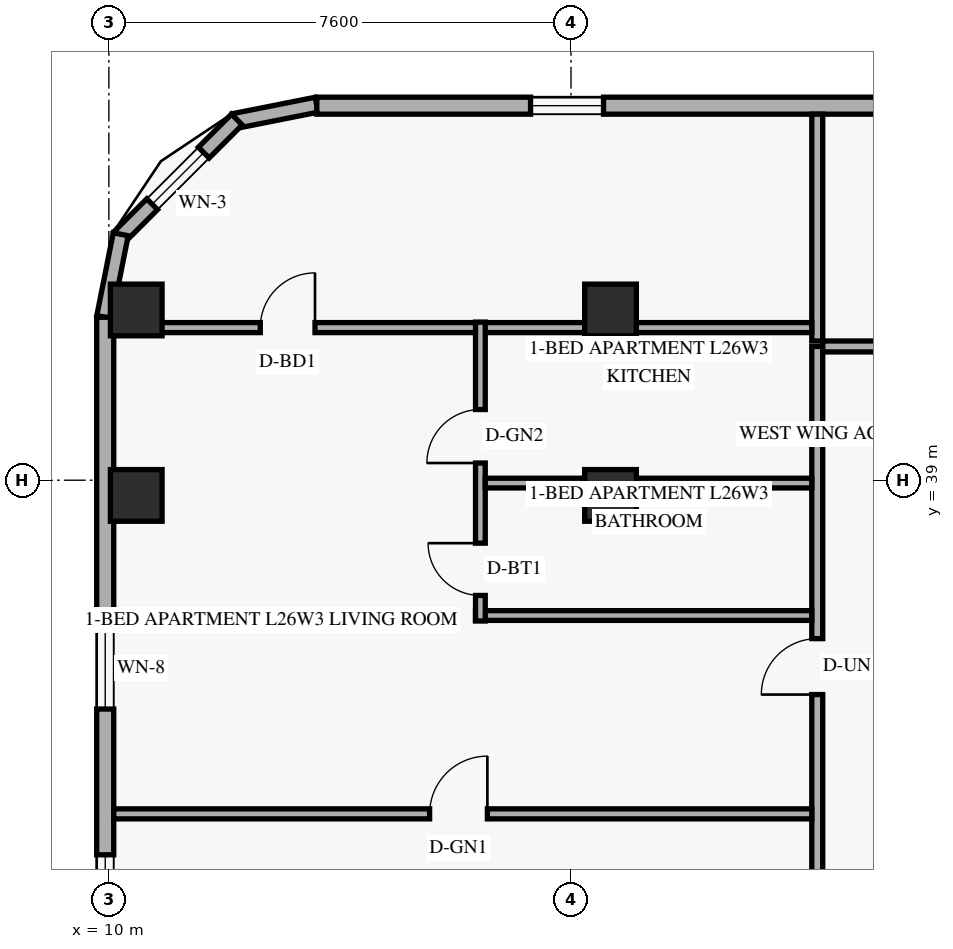
"""IFC4 building model, lengths in metres.
Left out: names, types, materials, properties, quantities, classifications, styles, units other than length and angle.
Written with IfcOpenShell. Run it as: python <this file> out.ifc"""

import sys

from ifc_helpers import new_model, si_unit, direction, frame, frame_2d, origin, origin_2d, place, context, subcontext, project, spatial, rectangle, extrude, element, fill, save


model = new_model("IFC4")
c1 = context("Model", 3, precision=1e-05, world=origin(), true_north=direction((0.0, 1.0)))
c2 = subcontext(c1, "Body", "Model", "MODEL_VIEW")
j1 = project(units=[si_unit("LENGTHUNIT", "METRE"), si_unit("PLANEANGLEUNIT", "RADIAN")], contexts=[c1])
p1 = place(None, origin())
s1 = spatial("IfcSite", under=j1, at=p1, CompositionType="ELEMENT")
p2 = place(p1, origin())
s2 = spatial("IfcBuilding", under=s1, at=p2, CompositionType="ELEMENT")
p3 = place(p2, frame((0.0, 0.0, 102.6)))
s3 = spatial("IfcBuildingStorey", under=s2, at=p3, CompositionType="ELEMENT", Elevation=102.6)
for number, where, z_axis, x_axis in (
    (1, (10.45, 38.75, 0.0), (0.0, 0.0, 1.0), (1.0, 0.0, 0.0)),
    (2, (10.45, 41.8, 0.0), (0.0, 0.0, 1.0), (1.0, 0.0, 0.0)),
    (3, (18.25, 38.75, 0.0), (0.0, 0.0, 1.0), (1.0, 0.0, 0.0)),
    (4, (18.25, 41.8, 0.0), (0.0, 0.0, 1.0), (1.0, 0.0, 0.0)),
):
    element("IfcColumn", number, at=place(p3, frame(where, z_axis=z_axis, x_axis=x_axis)), inside=s3, PredefinedType="COLUMN", context=c2, shape_type="SweptSolid", body=[
        extrude(rectangle(XDim=0.85, YDim=0.85, at=origin_2d()), origin(), (0.0, 0.0, 1.0), 3.6),
    ])
p4 = place(p3, frame((13.417, 45.176, 0.0), z_axis=(0.0, 0.0, 1.0), x_axis=(-0.980809899341, -0.19496651342, 0.0)))
e5 = element("IfcWall", 5, at=p4, inside=s3, PredefinedType="SOLIDWALL", context=c2, shape_type="SweptSolid", body=[
    extrude(rectangle(XDim=1.389, YDim=0.25, at=frame_2d((0.694, 0.0))), origin(), (0.0, 0.0, 1.0), 3.36),
])
p5 = place(p3, frame((12.105, 44.932, 0.0), z_axis=(0.0, 0.0, 1.0), x_axis=(-0.707151344399, -0.707062215165, 0.0)))
e6 = element("IfcWall", 6, at=p5, inside=s3, PredefinedType="SOLIDWALL", context=c2, shape_type="SweptSolid", body=[
    extrude(rectangle(XDim=2.739, YDim=0.25, at=frame_2d((1.37, 0.0))), origin(), (0.0, 0.0, 1.0), 3.36),
])
p6 = place(p5, frame((0.77, 0.0, 0.85)))
e7 = element("IfcOpeningElement", 7, at=p6, cuts=e6, PredefinedType="OPENING", context=c2, shape_type="SweptSolid", body=[
    extrude(rectangle(XDim=1.2, YDim=1.5, at=frame_2d((0.6, 0.75))), frame((0.0, 0.135, 0.0), z_axis=(0.0, -1.0, 0.0), x_axis=(1.0, 0.0, 0.0)), (0.0, 0.0, 1.0), 0.27),
])
p7 = place(p3, frame((10.195, 43.045, 0.0), z_axis=(0.0, 0.0, 1.0), x_axis=(-0.195000137217, -0.980803214965, 0.0)))
e8 = element("IfcWall", 8, at=p7, inside=s3, PredefinedType="SOLIDWALL", context=c2, shape_type="SweptSolid", body=[
    extrude(rectangle(XDim=1.388, YDim=0.25, at=frame_2d((0.694, 0.0))), origin(), (0.0, 0.0, 1.0), 3.36),
])
p8 = place(p3, frame((49.98, 45.16, 0.0), z_axis=(0.0, 0.0, 1.0), x_axis=(-1.0, 0.0, 0.0)))
e9 = element("IfcWall", 9, at=p8, inside=s3, PredefinedType="SOLIDWALL", context=c2, shape_type="SweptSolid", body=[
    extrude(rectangle(XDim=36.56, YDim=0.28, at=frame_2d((18.28, 0.0))), origin(), (0.0, 0.0, 1.0), 3.36),
])
p9 = place(p8, frame((31.845, 0.0, 0.85)))
e10 = element("IfcOpeningElement", 10, at=p9, cuts=e9, PredefinedType="OPENING", context=c2, shape_type="SweptSolid", body=[
    extrude(rectangle(XDim=1.2, YDim=1.5, at=frame_2d((0.6, 0.75))), frame((0.0, 0.15, 0.0), z_axis=(0.0, -1.0, 0.0), x_axis=(1.0, 0.0, 0.0)), (0.0, 0.0, 1.0), 0.3),
])
p10 = place(p8, frame((23.78, 0.0, 0.85)))
e11 = element("IfcOpeningElement", 11, at=p10, cuts=e9, PredefinedType="OPENING", context=c2, shape_type="SweptSolid", body=[
    extrude(rectangle(XDim=1.2, YDim=1.5, at=frame_2d((0.6, 0.75))), frame((0.0, 0.15, 0.0), z_axis=(0.0, -1.0, 0.0), x_axis=(1.0, 0.0, 0.0)), (0.0, 0.0, 1.0), 0.3),
])
p11 = place(p8, frame((16.895, 0.0, 0.85)))
e12 = element("IfcOpeningElement", 12, at=p11, cuts=e9, PredefinedType="OPENING", context=c2, shape_type="SweptSolid", body=[
    extrude(rectangle(XDim=1.2, YDim=1.5, at=frame_2d((0.6, 0.75))), frame((0.0, 0.15, 0.0), z_axis=(0.0, -1.0, 0.0), x_axis=(1.0, 0.0, 0.0)), (0.0, 0.0, 1.0), 0.3),
])
p12 = place(p8, frame((10.865, 0.0, 0.85)))
e13 = element("IfcOpeningElement", 13, at=p12, cuts=e9, PredefinedType="OPENING", context=c2, shape_type="SweptSolid", body=[
    extrude(rectangle(XDim=1.2, YDim=1.5, at=frame_2d((0.6, 0.75))), frame((0.0, 0.15, 0.0), z_axis=(0.0, -1.0, 0.0), x_axis=(1.0, 0.0, 0.0)), (0.0, 0.0, 1.0), 0.3),
])
p13 = place(p8, frame((5.275, 0.0, 0.85)))
e14 = element("IfcOpeningElement", 14, at=p13, cuts=e9, PredefinedType="OPENING", context=c2, shape_type="SweptSolid", body=[
    extrude(rectangle(XDim=1.2, YDim=1.5, at=frame_2d((0.6, 0.75))), frame((0.0, 0.15, 0.0), z_axis=(0.0, -1.0, 0.0), x_axis=(1.0, 0.0, 0.0)), (0.0, 0.0, 1.0), 0.3),
])
p14 = place(p8, frame((1.09, 0.0, 0.85)))
e15 = element("IfcOpeningElement", 15, at=p14, cuts=e9, PredefinedType="OPENING", context=c2, shape_type="SweptSolid", body=[
    extrude(rectangle(XDim=1.2, YDim=1.5, at=frame_2d((0.6, 0.75))), frame((0.0, 0.15, 0.0), z_axis=(0.0, -1.0, 0.0), x_axis=(1.0, 0.0, 0.0)), (0.0, 0.0, 1.0), 0.3),
])
p15 = place(p3, frame((9.94, 41.68, 0.0), z_axis=(0.0, 0.0, 1.0), x_axis=(0.0, -1.0, 0.0)))
e16 = element("IfcWall", 16, at=p15, inside=s3, PredefinedType="SOLIDWALL", context=c2, shape_type="SweptSolid", body=[
    extrude(rectangle(XDim=35.36, YDim=0.28, at=frame_2d((17.68, 0.0))), origin(), (0.0, 0.0, 1.0), 3.36),
])
p16 = place(p15, frame((27.994, 0.0, 0.85)))
e17 = element("IfcOpeningElement", 17, at=p16, cuts=e16, PredefinedType="OPENING", context=c2, shape_type="SweptSolid", body=[
    extrude(rectangle(XDim=1.35, YDim=1.55, at=frame_2d((0.675, 0.775))), frame((0.0, 0.15, 0.0), z_axis=(0.0, -1.0, 0.0), x_axis=(1.0, 0.0, 0.0)), (0.0, 0.0, 1.0), 0.3),
])
p17 = place(p15, frame((22.018, 0.0, 0.85)))
e18 = element("IfcOpeningElement", 18, at=p17, cuts=e16, PredefinedType="OPENING", context=c2, shape_type="SweptSolid", body=[
    extrude(rectangle(XDim=1.35, YDim=1.55, at=frame_2d((0.675, 0.775))), frame((0.0, 0.15, 0.0), z_axis=(0.0, -1.0, 0.0), x_axis=(1.0, 0.0, 0.0)), (0.0, 0.0, 1.0), 0.3),
])
p18 = place(p15, frame((17.6, 0.0, 0.85)))
e19 = element("IfcOpeningElement", 19, at=p18, cuts=e16, PredefinedType="OPENING", context=c2, shape_type="SweptSolid", body=[
    extrude(rectangle(XDim=1.35, YDim=1.55, at=frame_2d((0.675, 0.775))), frame((0.0, 0.15, 0.0), z_axis=(0.0, -1.0, 0.0), x_axis=(1.0, 0.0, 0.0)), (0.0, 0.0, 1.0), 0.3),
])
p19 = place(p15, frame((12.712, 0.0, 0.85)))
e20 = element("IfcOpeningElement", 20, at=p19, cuts=e16, PredefinedType="OPENING", context=c2, shape_type="SweptSolid", body=[
    extrude(rectangle(XDim=1.35, YDim=1.55, at=frame_2d((0.675, 0.775))), frame((0.0, 0.15, 0.0), z_axis=(0.0, -1.0, 0.0), x_axis=(1.0, 0.0, 0.0)), (0.0, 0.0, 1.0), 0.3),
])
p20 = place(p15, frame((8.841, 0.0, 0.85)))
e21 = element("IfcOpeningElement", 21, at=p20, cuts=e16, PredefinedType="OPENING", context=c2, shape_type="SweptSolid", body=[
    extrude(rectangle(XDim=1.35, YDim=1.55, at=frame_2d((0.675, 0.775))), frame((0.0, 0.15, 0.0), z_axis=(0.0, -1.0, 0.0), x_axis=(1.0, 0.0, 0.0)), (0.0, 0.0, 1.0), 0.3),
])
p21 = place(p15, frame((5.094, 0.0, 0.85)))
e22 = element("IfcOpeningElement", 22, at=p21, cuts=e16, PredefinedType="OPENING", context=c2, shape_type="SweptSolid", body=[
    extrude(rectangle(XDim=1.35, YDim=1.55, at=frame_2d((0.675, 0.775))), frame((0.0, 0.15, 0.0), z_axis=(0.0, -1.0, 0.0), x_axis=(1.0, 0.0, 0.0)), (0.0, 0.0, 1.0), 0.3),
])
p22 = place(p3, frame((21.65, 6.8, 0.0), z_axis=(0.0, 0.0, 1.0), x_axis=(0.0, 1.0, 0.0)))
e23 = element("IfcWall", 23, at=p22, inside=s3, PredefinedType="STANDARD", context=c2, shape_type="SweptSolid", body=[
    extrude(rectangle(XDim=34.4, YDim=0.18, at=frame_2d((17.2, 0.0))), origin(), (0.0, 0.0, 1.0), 2.731),
])
p23 = place(p22, frame((3.592, 0.0, 0.0)))
e24 = element("IfcOpeningElement", 24, at=p23, cuts=e23, PredefinedType="OPENING", context=c2, shape_type="SweptSolid", body=[
    extrude(rectangle(XDim=0.92, YDim=2.15, at=frame_2d((0.46, 1.075))), frame((0.0, 0.1, 0.0), z_axis=(0.0, -1.0, 0.0), x_axis=(1.0, 0.0, 0.0)), (0.0, 0.0, 1.0), 0.2),
])
p24 = place(p22, frame((14.019, 0.0, 0.0)))
e25 = element("IfcOpeningElement", 25, at=p24, cuts=e23, PredefinedType="OPENING", context=c2, shape_type="SweptSolid", body=[
    extrude(rectangle(XDim=0.92, YDim=2.15, at=frame_2d((0.46, 1.075))), frame((0.0, 0.1, 0.0), z_axis=(0.0, -1.0, 0.0), x_axis=(1.0, 0.0, 0.0)), (0.0, 0.0, 1.0), 0.2),
])
p25 = place(p22, frame((28.675, 0.0, 0.0)))
e26 = element("IfcOpeningElement", 26, at=p25, cuts=e23, PredefinedType="OPENING", context=c2, shape_type="SweptSolid", body=[
    extrude(rectangle(XDim=0.92, YDim=2.15, at=frame_2d((0.46, 1.075))), frame((0.0, 0.1, 0.0), z_axis=(0.0, -1.0, 0.0), x_axis=(1.0, 0.0, 0.0)), (0.0, 0.0, 1.0), 0.2),
])
p26 = place(p3, frame((21.74, 41.2, 0.0), z_axis=(0.0, 0.0, 1.0), x_axis=(1.0, 0.0, 0.0)))
e27 = element("IfcWall", 27, at=p26, inside=s3, PredefinedType="STANDARD", context=c2, shape_type="SweptSolid", body=[
    extrude(rectangle(XDim=13.68, YDim=0.18, at=frame_2d((6.84, 0.0))), origin(), (0.0, 0.0, 1.0), 2.731),
])
p27 = place(p26, frame((3.09, 0.0, 0.0)))
e28 = element("IfcOpeningElement", 28, at=p27, cuts=e27, PredefinedType="OPENING", context=c2, shape_type="SweptSolid", body=[
    extrude(rectangle(XDim=0.95, YDim=2.15, at=frame_2d((0.475, 1.075))), frame((0.0, 0.1, 0.0), z_axis=(0.0, -1.0, 0.0), x_axis=(1.0, 0.0, 0.0)), (0.0, 0.0, 1.0), 0.2),
])
p28 = place(p26, frame((10.11, 0.0, 0.0)))
e29 = element("IfcOpeningElement", 29, at=p28, cuts=e27, PredefinedType="OPENING", context=c2, shape_type="SweptSolid", body=[
    extrude(rectangle(XDim=0.95, YDim=2.15, at=frame_2d((0.475, 1.075))), frame((0.0, 0.1, 0.0), z_axis=(0.0, -1.0, 0.0), x_axis=(1.0, 0.0, 0.0)), (0.0, 0.0, 1.0), 0.2),
])
p29 = place(p3, frame((21.65, 41.29, 0.0), z_axis=(0.0, 0.0, 1.0), x_axis=(0.0, 1.0, 0.0)))
e30 = element("IfcWall", 30, at=p29, inside=s3, PredefinedType="PARTITIONING", context=c2, shape_type="SweptSolid", body=[
    extrude(rectangle(XDim=3.73, YDim=0.18, at=frame_2d((1.865, 0.0))), origin(), (0.0, 0.0, 1.0), 2.809),
])
p30 = place(p3, frame((10.08, 41.51, 0.0), z_axis=(0.0, 0.0, 1.0), x_axis=(1.0, 0.0, 0.0)))
e31 = element("IfcWall", 31, at=p30, inside=s3, PredefinedType="PARTITIONING", context=c2, shape_type="SweptSolid", body=[
    extrude(rectangle(XDim=11.48, YDim=0.165, at=frame_2d((5.74, 0.0))), origin(), (0.0, 0.0, 1.0), 3.36),
])
p31 = place(p30, frame((2.41, 0.0, 0.0)))
e32 = element("IfcOpeningElement", 32, at=p31, cuts=e31, PredefinedType="OPENING", context=c2, shape_type="SweptSolid", body=[
    extrude(rectangle(XDim=0.9, YDim=2.14, at=frame_2d((0.45, 1.07))), frame((0.0, 0.093, 0.0), z_axis=(0.0, -1.0, 0.0), x_axis=(1.0, 0.0, 0.0)), (0.0, 0.0, 1.0), 0.185),
])
p32 = place(p3, frame((16.03, 36.774, 0.0), z_axis=(0.0, 0.0, 1.0), x_axis=(1.0, 0.0, 0.0)))
e33 = element("IfcWall", 33, at=p32, inside=s3, PredefinedType="PLUMBINGWALL", context=c2, shape_type="SweptSolid", body=[
    extrude(rectangle(XDim=5.53, YDim=0.16, at=frame_2d((2.765, 0.0))), origin(), (0.0, 0.0, 1.0), 2.731),
])
p33 = place(p3, frame((16.11, 36.685, 0.0), z_axis=(0.0, 0.0, 1.0), x_axis=(0.0, 1.0, 0.0)))
e34 = element("IfcWall", 34, at=p33, inside=s3, PredefinedType="PLUMBINGWALL", context=c2, shape_type="SweptSolid", body=[
    extrude(rectangle(XDim=4.916, YDim=0.16, at=frame_2d((2.458, 0.0))), origin(), (0.0, 0.0, 1.0), 2.731),
])
p34 = place(p33, frame((0.42, 0.0, 0.0)))
e35 = element("IfcOpeningElement", 35, at=p34, cuts=e34, PredefinedType="OPENING", context=c2, shape_type="SweptSolid", body=[
    extrude(rectangle(XDim=0.86, YDim=2.12, at=frame_2d((0.43, 1.06))), frame((0.0, 0.09, 0.0), z_axis=(0.0, -1.0, 0.0), x_axis=(1.0, 0.0, 0.0)), (0.0, 0.0, 1.0), 0.18),
])
p35 = place(p33, frame((2.598, 0.0, 0.0)))
e36 = element("IfcOpeningElement", 36, at=p35, cuts=e34, PredefinedType="OPENING", context=c2, shape_type="SweptSolid", body=[
    extrude(rectangle(XDim=0.88, YDim=2.12, at=frame_2d((0.44, 1.06))), frame((0.0, 0.09, 0.0), z_axis=(0.0, -1.0, 0.0), x_axis=(1.0, 0.0, 0.0)), (0.0, 0.0, 1.0), 0.18),
])
p36 = place(p3, frame((16.19, 38.953, 0.0), z_axis=(0.0, 0.0, 1.0), x_axis=(1.0, 0.0, 0.0)))
e37 = element("IfcWall", 37, at=p36, inside=s3, PredefinedType="PLUMBINGWALL", context=c2, shape_type="SweptSolid", body=[
    extrude(rectangle(XDim=5.37, YDim=0.16, at=frame_2d((2.685, 0.0))), origin(), (0.0, 0.0, 1.0), 2.731),
])
p37 = place(p3, frame((10.08, 33.512, 0.0), z_axis=(0.0, 0.0, 1.0), x_axis=(1.0, 0.0, 0.0)))
e38 = element("IfcWall", 38, at=p37, inside=s3, PredefinedType="PARTITIONING", context=c2, shape_type="SweptSolid", body=[
    extrude(rectangle(XDim=11.48, YDim=0.165, at=frame_2d((5.74, 0.0))), origin(), (0.0, 0.0, 1.0), 2.731),
])
p38 = place(p37, frame((5.195, 0.0, 0.0)))
e39 = element("IfcOpeningElement", 39, at=p38, cuts=e38, PredefinedType="OPENING", context=c2, shape_type="SweptSolid", body=[
    extrude(rectangle(XDim=0.95, YDim=2.15, at=frame_2d((0.475, 1.075))), frame((0.0, 0.093, 0.0), z_axis=(0.0, -1.0, 0.0), x_axis=(1.0, 0.0, 0.0)), (0.0, 0.0, 1.0), 0.185),
])
p39 = place(p6, origin())
e40 = element("IfcWindow", 40, at=p39, inside=s3, PartitioningType="SINGLE_PANEL", PredefinedType="WINDOW", context=c2, shape_type="SweptSolid", body=[
    extrude(rectangle(XDim=1.2, YDim=1.5, at=frame_2d((0.6, 0.75))), frame((0.0, 0.03, 0.0), z_axis=(0.0, -1.0, 0.0), x_axis=(1.0, 0.0, 0.0)), (0.0, 0.0, 1.0), 0.06),
])
fill(e7, e40)
p40 = place(p9, origin())
e41 = element("IfcWindow", 41, at=p40, inside=s3, PartitioningType="SINGLE_PANEL", PredefinedType="WINDOW", context=c2, shape_type="SweptSolid", body=[
    extrude(rectangle(XDim=1.2, YDim=1.5, at=frame_2d((0.6, 0.75))), frame((0.0, 0.03, 0.0), z_axis=(0.0, -1.0, 0.0), x_axis=(1.0, 0.0, 0.0)), (0.0, 0.0, 1.0), 0.06),
])
fill(e10, e41)
p41 = place(p20, origin())
e42 = element("IfcWindow", 42, at=p41, inside=s3, PartitioningType="SINGLE_PANEL", PredefinedType="WINDOW", context=c2, shape_type="SweptSolid", body=[
    extrude(rectangle(XDim=1.35, YDim=1.55, at=frame_2d((0.675, 0.775))), frame((0.0, 0.03, 0.0), z_axis=(0.0, -1.0, 0.0), x_axis=(1.0, 0.0, 0.0)), (0.0, 0.0, 1.0), 0.06),
])
fill(e21, e42)
p42 = place(p21, origin())
e43 = element("IfcWindow", 43, at=p42, inside=s3, PartitioningType="SINGLE_PANEL", PredefinedType="WINDOW", context=c2, shape_type="SweptSolid", body=[
    extrude(rectangle(XDim=1.35, YDim=1.55, at=frame_2d((0.675, 0.775))), frame((0.0, 0.03, 0.0), z_axis=(0.0, -1.0, 0.0), x_axis=(1.0, 0.0, 0.0)), (0.0, 0.0, 1.0), 0.06),
])
fill(e22, e43)
p43 = place(p38, origin())
e44 = element("IfcDoor", 44, at=p43, inside=s3, OperationType="SINGLE_SWING_RIGHT", PredefinedType="DOOR", context=c2, shape_type="SweptSolid", body=[
    extrude(rectangle(XDim=0.95, YDim=2.15, at=frame_2d((0.475, 1.075))), frame((0.0, 0.025, 0.0), z_axis=(0.0, -1.0, 0.0), x_axis=(1.0, 0.0, 0.0)), (0.0, 0.0, 1.0), 0.05),
])
fill(e39, e44)
p44 = place(p25, origin())
e45 = element("IfcDoor", 45, at=p44, inside=s3, OperationType="SINGLE_SWING_LEFT", PredefinedType="DOOR", context=c2, shape_type="SweptSolid", body=[
    extrude(rectangle(XDim=0.92, YDim=2.15, at=frame_2d((0.46, 1.075))), frame((0.0, 0.025, 0.0), z_axis=(0.0, -1.0, 0.0), x_axis=(1.0, 0.0, 0.0)), (0.0, 0.0, 1.0), 0.05),
])
fill(e26, e45)
p45 = place(p34, origin())
e46 = element("IfcDoor", 46, at=p45, inside=s3, OperationType="SINGLE_SWING_RIGHT", PredefinedType="DOOR", context=c2, shape_type="SweptSolid", body=[
    extrude(rectangle(XDim=0.86, YDim=2.12, at=frame_2d((0.43, 1.06))), frame((0.0, 0.025, 0.0), z_axis=(0.0, -1.0, 0.0), x_axis=(1.0, 0.0, 0.0)), (0.0, 0.0, 1.0), 0.05),
])
fill(e35, e46)
p46 = place(p35, origin())
e47 = element("IfcDoor", 47, at=p46, inside=s3, OperationType="SINGLE_SWING_LEFT", PredefinedType="DOOR", context=c2, shape_type="SweptSolid", body=[
    extrude(rectangle(XDim=0.88, YDim=2.12, at=frame_2d((0.44, 1.06))), frame((0.0, 0.025, 0.0), z_axis=(0.0, -1.0, 0.0), x_axis=(1.0, 0.0, 0.0)), (0.0, 0.0, 1.0), 0.05),
])
fill(e36, e47)
p47 = place(p31, origin())
e48 = element("IfcDoor", 48, at=p47, inside=s3, OperationType="SINGLE_SWING_RIGHT", PredefinedType="DOOR", context=c2, shape_type="SweptSolid", body=[
    extrude(rectangle(XDim=0.9, YDim=2.14, at=frame_2d((0.45, 1.07))), frame((0.0, 0.025, 0.0), z_axis=(0.0, -1.0, 0.0), x_axis=(1.0, 0.0, 0.0)), (0.0, 0.0, 1.0), 0.05),
])
fill(e32, e48)
save(model, sys.argv[1])
